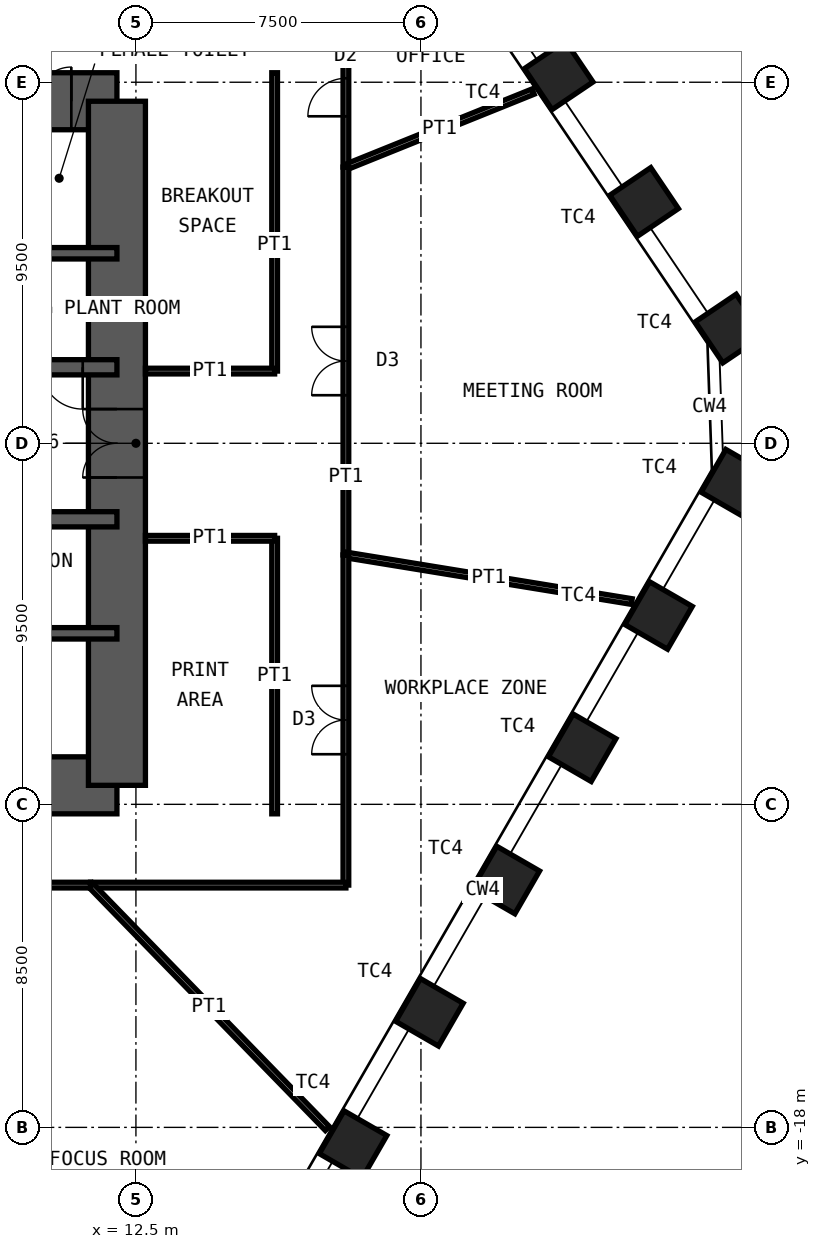
"""IFC4 building model, lengths in metres.
Left out: names, types, materials, properties, quantities, classifications, styles, units other than length and angle.
Written with IfcOpenShell. Run it as: python <this file> out.ifc"""

import sys

from ifc_helpers import new_model, si_unit, direction, frame, frame_2d, origin, origin_2d, place, context, subcontext, project, spatial, rectangle, hollow_rectangle, extrude, element, fill, save


model = new_model("IFC4")
c1 = context("Model", 3, precision=1e-05, world=origin(), true_north=direction((0.0, 1.0)))
c2 = subcontext(c1, "Body", "Model", "MODEL_VIEW")
j1 = project(units=[si_unit("LENGTHUNIT", "METRE"), si_unit("PLANEANGLEUNIT", "RADIAN")], contexts=[c1])
p1 = place(None, origin())
s1 = spatial("IfcSite", under=j1, at=p1, CompositionType="ELEMENT")
p2 = place(p1, origin())
s2 = spatial("IfcBuilding", under=s1, at=p2, CompositionType="ELEMENT")
p3 = place(p2, frame((0.0, 0.0, 149.2)))
s3 = spatial("IfcBuildingStorey", under=s2, at=p3, CompositionType="ELEMENT", Elevation=149.2)
for number, where, z_axis, x_axis in (
    (1, (23.625, 9.682, 0.0), (0.0, 0.0, 1.0), (-0.559, 0.829, 0.0)),
    (2, (25.872, 6.351, 0.0), (0.0, 0.0, 1.0), (-0.559, 0.829, 0.0)),
    (3, (28.119, 3.019, 0.0), (0.0, 0.0, 1.0), (-0.559, 0.829, 0.0)),
    (4, (28.261, -1.05, 0.0), (0.0, 0.0, 1.0), (0.5, 0.866, 0.0)),
    (5, (26.252, -4.53, 0.0), (0.0, 0.0, 1.0), (0.5, 0.866, 0.0)),
    (6, (24.242, -8.011, 0.0), (0.0, 0.0, 1.0), (0.5, 0.866, 0.0)),
    (7, (22.233, -11.491, 0.0), (0.0, 0.0, 1.0), (0.5, 0.866, 0.0)),
    (8, (20.223, -14.972, 0.0), (0.0, 0.0, 1.0), (0.5, 0.866, 0.0)),
    (9, (18.214, -18.453, 0.0), (0.0, 0.0, 1.0), (0.5, 0.866, 0.0)),
):
    element("IfcColumn", number, at=place(p3, frame(where, z_axis=z_axis, x_axis=x_axis)), inside=s3, PredefinedType="COLUMN", context=c2, shape_type="SweptSolid", body=[
        extrude(hollow_rectangle(XDim=1.3, YDim=1.3, WallThickness=0.1, at=origin_2d()), origin(), (0.0, 0.0, 1.0), 4.2),
    ])
p4 = place(p3, frame((-12.0, 9.0, 0.0), z_axis=(0.0, 0.0, 1.0), x_axis=(1.0, 0.0, 0.0)))
e10 = element("IfcWall", 10, at=p4, inside=s3, PredefinedType="SHEAR", context=c2, shape_type="SweptSolid", body=[
    extrude(rectangle(XDim=24.0, YDim=1.5, at=frame_2d((12.0, 0.0))), origin(), (0.0, 0.0, 1.0), 4.2),
])
p5 = place(p4, frame((10.4, 0.0, 0.0)))
e11 = element("IfcOpeningElement", 11, at=p5, cuts=e10, PredefinedType="OPENING", context=c2, shape_type="SweptSolid", body=[
    extrude(rectangle(XDim=1.0, YDim=2.1, at=frame_2d((0.5, 1.05))), frame((0.0, 0.76, 0.0), z_axis=(0.0, -1.0, 0.0), x_axis=(1.0, 0.0, 0.0)), (0.0, 0.0, 1.0), 1.52),
])
p6 = place(p4, frame((17.6, 0.0, 0.0)))
e12 = element("IfcOpeningElement", 12, at=p6, cuts=e10, PredefinedType="OPENING", context=c2, shape_type="SweptSolid", body=[
    extrude(rectangle(XDim=0.9, YDim=2.1, at=frame_2d((0.45, 1.05))), frame((0.0, 0.76, 0.0), z_axis=(0.0, -1.0, 0.0), x_axis=(1.0, 0.0, 0.0)), (0.0, 0.0, 1.0), 1.52),
])
p7 = place(p4, frame((21.9, 0.0, 0.0)))
e13 = element("IfcOpeningElement", 13, at=p7, cuts=e10, PredefinedType="OPENING", context=c2, shape_type="SweptSolid", body=[
    extrude(rectangle(XDim=0.9, YDim=2.1, at=frame_2d((0.45, 1.05))), frame((0.0, 0.76, 0.0), z_axis=(0.0, -1.0, 0.0), x_axis=(1.0, 0.0, 0.0)), (0.0, 0.0, 1.0), 1.52),
])
p8 = place(p3, frame((-12.0, -9.0, 0.0), z_axis=(0.0, 0.0, 1.0), x_axis=(1.0, 0.0, 0.0)))
e14 = element("IfcWall", 14, at=p8, inside=s3, PredefinedType="SHEAR", context=c2, shape_type="SweptSolid", body=[
    extrude(rectangle(XDim=24.0, YDim=1.5, at=frame_2d((12.0, 0.0))), origin(), (0.0, 0.0, 1.0), 4.2),
])
p9 = place(p8, frame((1.35, 0.0, 0.0)))
e15 = element("IfcOpeningElement", 15, at=p9, cuts=e14, PredefinedType="OPENING", context=c2, shape_type="SweptSolid", body=[
    extrude(rectangle(XDim=1.0, YDim=2.1, at=frame_2d((0.5, 1.05))), frame((0.0, 0.76, 0.0), z_axis=(0.0, -1.0, 0.0), x_axis=(1.0, 0.0, 0.0)), (0.0, 0.0, 1.0), 1.52),
])
p10 = place(p8, frame((5.325, 0.0, 0.0)))
e16 = element("IfcOpeningElement", 16, at=p10, cuts=e14, PredefinedType="OPENING", context=c2, shape_type="SweptSolid", body=[
    extrude(rectangle(XDim=1.15, YDim=2.1, at=frame_2d((0.575, 1.05))), frame((0.0, 0.76, 0.0), z_axis=(0.0, -1.0, 0.0), x_axis=(1.0, 0.0, 0.0)), (0.0, 0.0, 1.0), 1.52),
])
p11 = place(p8, frame((12.6, 0.0, 0.0)))
e17 = element("IfcOpeningElement", 17, at=p11, cuts=e14, PredefinedType="OPENING", context=c2, shape_type="SweptSolid", body=[
    extrude(rectangle(XDim=1.0, YDim=2.1, at=frame_2d((0.5, 1.05))), frame((0.0, 0.76, 0.0), z_axis=(0.0, -1.0, 0.0), x_axis=(1.0, 0.0, 0.0)), (0.0, 0.0, 1.0), 1.52),
])
p12 = place(p3, frame((12.0, -9.0, 0.0), z_axis=(0.0, 0.0, 1.0), x_axis=(0.0, 1.0, 0.0)))
e18 = element("IfcWall", 18, at=p12, inside=s3, PredefinedType="SHEAR", context=c2, shape_type="SweptSolid", body=[
    extrude(rectangle(XDim=18.0, YDim=1.5, at=frame_2d((9.0, 0.0))), origin(), (0.0, 0.0, 1.0), 4.2),
])
p13 = place(p12, frame((8.1, 0.0, 0.0)))
e19 = element("IfcOpeningElement", 19, at=p13, cuts=e18, PredefinedType="OPENING", context=c2, shape_type="SweptSolid", body=[
    extrude(rectangle(XDim=1.8, YDim=2.1, at=frame_2d((0.9, 1.05))), frame((0.0, 0.76, 0.0), z_axis=(0.0, -1.0, 0.0), x_axis=(1.0, 0.0, 0.0)), (0.0, 0.0, 1.0), 1.52),
])
p14 = place(p3, frame((-12.0, 5.0, 0.0), z_axis=(0.0, 0.0, 1.0), x_axis=(1.0, 0.0, 0.0)))
e20 = element("IfcWall", 20, at=p14, inside=s3, PredefinedType="SHEAR", context=c2, shape_type="SweptSolid", body=[
    extrude(rectangle(XDim=24.0, YDim=0.3, at=frame_2d((12.0, 0.0))), origin(), (0.0, 0.0, 1.0), 4.2),
])
p15 = place(p3, frame((-12.0, 2.0, 0.0), z_axis=(0.0, 0.0, 1.0), x_axis=(1.0, 0.0, 0.0)))
e21 = element("IfcWall", 21, at=p15, inside=s3, PredefinedType="SHEAR", context=c2, shape_type="SweptSolid", body=[
    extrude(rectangle(XDim=24.0, YDim=0.4, at=frame_2d((12.0, 0.0))), origin(), (0.0, 0.0, 1.0), 4.2),
])
p16 = place(p15, frame((2.4, 0.0, 0.0)))
e22 = element("IfcOpeningElement", 22, at=p16, cuts=e21, PredefinedType="OPENING", context=c2, shape_type="SweptSolid", body=[
    extrude(rectangle(XDim=1.1, YDim=2.1, at=frame_2d((0.55, 1.05))), frame((0.0, 0.21, 0.0), z_axis=(0.0, -1.0, 0.0), x_axis=(1.0, 0.0, 0.0)), (0.0, 0.0, 1.0), 0.42),
])
p17 = place(p15, frame((22.0, 0.0, 0.0)))
e23 = element("IfcOpeningElement", 23, at=p17, cuts=e21, PredefinedType="OPENING", context=c2, shape_type="SweptSolid", body=[
    extrude(rectangle(XDim=1.1, YDim=2.1, at=frame_2d((0.55, 1.05))), frame((0.0, 0.21, 0.0), z_axis=(0.0, -1.0, 0.0), x_axis=(1.0, 0.0, 0.0)), (0.0, 0.0, 1.0), 0.42),
])
p18 = place(p15, frame((10.15, 0.0, 0.0)))
e24 = element("IfcOpeningElement", 24, at=p18, cuts=e21, PredefinedType="OPENING", context=c2, shape_type="SweptSolid", body=[
    extrude(rectangle(XDim=1.0, YDim=2.1, at=frame_2d((0.5, 1.05))), frame((0.0, 0.21, 0.0), z_axis=(0.0, -1.0, 0.0), x_axis=(1.0, 0.0, 0.0)), (0.0, 0.0, 1.0), 0.42),
])
p19 = place(p15, frame((6.9, 0.0, 0.0)))
e25 = element("IfcOpeningElement", 25, at=p19, cuts=e21, PredefinedType="OPENING", context=c2, shape_type="SweptSolid", body=[
    extrude(rectangle(XDim=1.0, YDim=2.1, at=frame_2d((0.5, 1.05))), frame((0.0, 0.21, 0.0), z_axis=(0.0, -1.0, 0.0), x_axis=(1.0, 0.0, 0.0)), (0.0, 0.0, 1.0), 0.42),
])
p20 = place(p15, frame((13.35, 0.0, 0.0)))
e26 = element("IfcOpeningElement", 26, at=p20, cuts=e21, PredefinedType="OPENING", context=c2, shape_type="SweptSolid", body=[
    extrude(rectangle(XDim=1.1, YDim=2.4, at=frame_2d((0.55, 1.2))), frame((0.0, 0.21, 0.0), z_axis=(0.0, -1.0, 0.0), x_axis=(1.0, 0.0, 0.0)), (0.0, 0.0, 1.0), 0.42),
])
p21 = place(p15, frame((16.15, 0.0, 0.0)))
e27 = element("IfcOpeningElement", 27, at=p21, cuts=e21, PredefinedType="OPENING", context=c2, shape_type="SweptSolid", body=[
    extrude(rectangle(XDim=1.1, YDim=2.4, at=frame_2d((0.55, 1.2))), frame((0.0, 0.21, 0.0), z_axis=(0.0, -1.0, 0.0), x_axis=(1.0, 0.0, 0.0)), (0.0, 0.0, 1.0), 0.42),
])
p22 = place(p15, frame((18.95, 0.0, 0.0)))
e28 = element("IfcOpeningElement", 28, at=p22, cuts=e21, PredefinedType="OPENING", context=c2, shape_type="SweptSolid", body=[
    extrude(rectangle(XDim=1.1, YDim=2.4, at=frame_2d((0.55, 1.2))), frame((0.0, 0.21, 0.0), z_axis=(0.0, -1.0, 0.0), x_axis=(1.0, 0.0, 0.0)), (0.0, 0.0, 1.0), 0.42),
])
p23 = place(p3, frame((-12.0, -2.0, 0.0), z_axis=(0.0, 0.0, 1.0), x_axis=(1.0, 0.0, 0.0)))
e29 = element("IfcWall", 29, at=p23, inside=s3, PredefinedType="SHEAR", context=c2, shape_type="SweptSolid", body=[
    extrude(rectangle(XDim=24.0, YDim=0.4, at=frame_2d((12.0, 0.0))), origin(), (0.0, 0.0, 1.0), 4.2),
])
p24 = place(p23, frame((1.1, 0.0, 0.0)))
e30 = element("IfcOpeningElement", 30, at=p24, cuts=e29, PredefinedType="OPENING", context=c2, shape_type="SweptSolid", body=[
    extrude(rectangle(XDim=1.1, YDim=2.1, at=frame_2d((0.55, 1.05))), frame((0.0, 0.21, 0.0), z_axis=(0.0, -1.0, 0.0), x_axis=(1.0, 0.0, 0.0)), (0.0, 0.0, 1.0), 0.42),
])
p25 = place(p23, frame((13.55, 0.0, 0.0)))
e31 = element("IfcOpeningElement", 31, at=p25, cuts=e29, PredefinedType="OPENING", context=c2, shape_type="SweptSolid", body=[
    extrude(rectangle(XDim=1.1, YDim=2.1, at=frame_2d((0.55, 1.05))), frame((0.0, 0.21, 0.0), z_axis=(0.0, -1.0, 0.0), x_axis=(1.0, 0.0, 0.0)), (0.0, 0.0, 1.0), 0.42),
])
p26 = place(p23, frame((20.7, 0.0, 0.0)))
e32 = element("IfcOpeningElement", 32, at=p26, cuts=e29, PredefinedType="OPENING", context=c2, shape_type="SweptSolid", body=[
    extrude(rectangle(XDim=1.1, YDim=2.1, at=frame_2d((0.55, 1.05))), frame((0.0, 0.21, 0.0), z_axis=(0.0, -1.0, 0.0), x_axis=(1.0, 0.0, 0.0)), (0.0, 0.0, 1.0), 0.42),
])
p27 = place(p23, frame((4.0, 0.0, 0.0)))
e33 = element("IfcOpeningElement", 33, at=p27, cuts=e29, PredefinedType="OPENING", context=c2, shape_type="SweptSolid", body=[
    extrude(rectangle(XDim=1.0, YDim=2.1, at=frame_2d((0.5, 1.05))), frame((0.0, 0.21, 0.0), z_axis=(0.0, -1.0, 0.0), x_axis=(1.0, 0.0, 0.0)), (0.0, 0.0, 1.0), 0.42),
])
p28 = place(p3, frame((-12.0, -5.0, 0.0), z_axis=(0.0, 0.0, 1.0), x_axis=(1.0, 0.0, 0.0)))
e34 = element("IfcWall", 34, at=p28, inside=s3, PredefinedType="SHEAR", context=c2, shape_type="SweptSolid", body=[
    extrude(rectangle(XDim=24.0, YDim=0.3, at=frame_2d((12.0, 0.0))), origin(), (0.0, 0.0, 1.0), 4.2),
])
p29 = place(p3, frame((18.025, 10.941, 0.0), z_axis=(0.0, 0.0, 1.0), x_axis=(0.0, -1.0, 0.0)))
e35 = element("IfcWall", 35, at=p29, inside=s3, PredefinedType="PARTITIONING", context=c2, shape_type="SweptSolid", body=[
    extrude(rectangle(XDim=3.673, YDim=0.15, at=frame_2d((1.837, 0.0))), origin(), (0.0, 0.0, 1.0), 4.03),
])
p30 = place(p29, frame((1.337, 0.0, 0.0)))
e36 = element("IfcOpeningElement", 36, at=p30, cuts=e35, PredefinedType="OPENING", context=c2, shape_type="SweptSolid", body=[
    extrude(rectangle(XDim=1.0, YDim=2.4, at=frame_2d((0.5, 1.2))), frame((0.0, 0.085, 0.0), z_axis=(0.0, -1.0, 0.0), x_axis=(1.0, 0.0, 0.0)), (0.0, 0.0, 1.0), 0.17),
])
p31 = place(p3, frame((22.951, 9.254, 0.0), z_axis=(0.0, 0.0, 1.0), x_axis=(-0.927452527427, -0.37394091695, 0.0)))
e37 = element("IfcWall", 37, at=p31, inside=s3, PredefinedType="PARTITIONING", context=c2, shape_type="SweptSolid", body=[
    extrude(rectangle(XDim=5.312, YDim=0.15, at=frame_2d((2.656, 0.0))), origin(), (0.0, 0.0, 1.0), 3.33),
])
p32 = place(p3, frame((18.025, 7.267, 0.0), z_axis=(0.0, 0.0, 1.0), x_axis=(0.0, -1.0, 0.0)))
e38 = element("IfcWall", 38, at=p32, inside=s3, PredefinedType="PARTITIONING", context=c2, shape_type="SweptSolid", body=[
    extrude(rectangle(XDim=10.205, YDim=0.15, at=frame_2d((5.103, 0.0))), origin(), (0.0, 0.0, 1.0), 4.03),
])
p33 = place(p32, frame((4.203, 0.0, 0.0)))
e39 = element("IfcOpeningElement", 39, at=p33, cuts=e38, PredefinedType="OPENING", context=c2, shape_type="SweptSolid", body=[
    extrude(rectangle(XDim=1.8, YDim=2.4, at=frame_2d((0.9, 1.2))), frame((0.0, 0.085, 0.0), z_axis=(0.0, -1.0, 0.0), x_axis=(1.0, 0.0, 0.0)), (0.0, 0.0, 1.0), 0.17),
])
p34 = place(p3, frame((25.547, -4.164, 0.0), z_axis=(0.0, 0.0, 1.0), x_axis=(-0.986975470567, 0.160870819291, 0.0)))
e40 = element("IfcWall", 40, at=p34, inside=s3, PredefinedType="PARTITIONING", context=c2, shape_type="SweptSolid", body=[
    extrude(rectangle(XDim=7.622, YDim=0.15, at=frame_2d((3.811, 0.0))), origin(), (0.0, 0.0, 1.0), 4.03),
])
p35 = place(p3, frame((18.025, -2.938, 0.0), z_axis=(0.0, 0.0, 1.0), x_axis=(0.0, -1.0, 0.0)))
e41 = element("IfcWall", 41, at=p35, inside=s3, PredefinedType="PARTITIONING", context=c2, shape_type="SweptSolid", body=[
    extrude(rectangle(XDim=8.687, YDim=0.15, at=frame_2d((4.344, 0.0))), origin(), (0.0, 0.0, 1.0), 4.03),
])
p36 = place(p35, frame((3.443, 0.0, 0.0)))
e42 = element("IfcOpeningElement", 42, at=p36, cuts=e41, PredefinedType="OPENING", context=c2, shape_type="SweptSolid", body=[
    extrude(rectangle(XDim=1.8, YDim=2.4, at=frame_2d((0.9, 1.2))), frame((0.0, 0.085, 0.0), z_axis=(0.0, -1.0, 0.0), x_axis=(1.0, 0.0, 0.0)), (0.0, 0.0, 1.0), 0.17),
])
p37 = place(p3, frame((18.025, -11.625, 0.0), z_axis=(0.0, 0.0, 1.0), x_axis=(-1.0, 0.0, 0.0)))
e43 = element("IfcWall", 43, at=p37, inside=s3, PredefinedType="PARTITIONING", context=c2, shape_type="SweptSolid", body=[
    extrude(rectangle(XDim=6.718, YDim=0.15, at=frame_2d((3.359, 0.0))), origin(), (0.0, 0.0, 1.0), 4.03),
])
p38 = place(p3, frame((17.538, -18.031, 0.0), z_axis=(0.0, 0.0, 1.0), x_axis=(-0.697230918085, 0.716846599257, 0.0)))
e44 = element("IfcWall", 44, at=p38, inside=s3, PredefinedType="PARTITIONING", context=c2, shape_type="SweptSolid", body=[
    extrude(rectangle(XDim=8.936, YDim=0.15, at=frame_2d((4.468, 0.0))), origin(), (0.0, 0.0, 1.0), 3.33),
])
p39 = place(p3, frame((11.307, -11.625, 0.0), z_axis=(0.0, 0.0, 1.0), x_axis=(-1.0, 0.0, 0.0)))
e45 = element("IfcWall", 45, at=p39, inside=s3, PredefinedType="PARTITIONING", context=c2, shape_type="SweptSolid", body=[
    extrude(rectangle(XDim=7.123, YDim=0.15, at=frame_2d((3.562, 0.0))), origin(), (0.0, 0.0, 1.0), 4.03),
])
p40 = place(p39, frame((3.062, 0.0, 0.0)))
e46 = element("IfcOpeningElement", 46, at=p40, cuts=e45, PredefinedType="OPENING", context=c2, shape_type="SweptSolid", body=[
    extrude(rectangle(XDim=1.0, YDim=2.4, at=frame_2d((0.5, 1.2))), frame((0.0, 0.085, 0.0), z_axis=(0.0, -1.0, 0.0), x_axis=(1.0, 0.0, 0.0)), (0.0, 0.0, 1.0), 0.17),
])
p41 = place(p3, frame((16.15, 1.9, 0.0), z_axis=(0.0, 0.0, 1.0), x_axis=(0.0, 1.0, 0.0)))
e47 = element("IfcWall", 47, at=p41, inside=s3, PredefinedType="PARTITIONING", context=c2, shape_type="SweptSolid", body=[
    extrude(rectangle(XDim=7.85, YDim=0.15, at=frame_2d((3.925, 0.0))), origin(), (0.0, 0.0, 1.0), 4.03),
])
p42 = place(p3, frame((12.75, 1.9, 0.0), z_axis=(0.0, 0.0, 1.0), x_axis=(1.0, 0.0, 0.0)))
e48 = element("IfcWall", 48, at=p42, inside=s3, PredefinedType="PARTITIONING", context=c2, shape_type="SweptSolid", body=[
    extrude(rectangle(XDim=3.4, YDim=0.15, at=frame_2d((1.7, 0.0))), origin(), (0.0, 0.0, 1.0), 2.93),
])
p43 = place(p3, frame((16.15, -9.75, 0.0), z_axis=(0.0, 0.0, 1.0), x_axis=(0.0, 1.0, 0.0)))
e49 = element("IfcWall", 49, at=p43, inside=s3, PredefinedType="PARTITIONING", context=c2, shape_type="SweptSolid", body=[
    extrude(rectangle(XDim=7.25, YDim=0.15, at=frame_2d((3.625, 0.0))), origin(), (0.0, 0.0, 1.0), 4.03),
])
p44 = place(p3, frame((12.75, -2.5, 0.0), z_axis=(0.0, 0.0, 1.0), x_axis=(1.0, 0.0, 0.0)))
e50 = element("IfcWall", 50, at=p44, inside=s3, PredefinedType="PARTITIONING", context=c2, shape_type="SweptSolid", body=[
    extrude(rectangle(XDim=3.4, YDim=0.15, at=frame_2d((1.7, 0.0))), origin(), (0.0, 0.0, 1.0), 3.33),
])
p45 = place(p7, origin())
e51 = element("IfcDoor", 51, at=p45, inside=s3, OperationType="SINGLE_SWING_LEFT", PredefinedType="DOOR", context=c2, shape_type="SweptSolid", body=[
    extrude(rectangle(XDim=0.9, YDim=2.1, at=frame_2d((0.45, 1.05))), frame((0.0, 0.025, 0.0), z_axis=(0.0, -1.0, 0.0), x_axis=(1.0, 0.0, 0.0)), (0.0, 0.0, 1.0), 0.05),
])
fill(e13, e51)
p46 = place(p17, origin())
e52 = element("IfcDoor", 52, at=p46, inside=s3, OperationType="SINGLE_SWING_RIGHT", PredefinedType="DOOR", context=c2, shape_type="SweptSolid", body=[
    extrude(rectangle(XDim=1.1, YDim=2.1, at=frame_2d((0.55, 1.05))), frame((0.0, 0.025, 0.0), z_axis=(0.0, -1.0, 0.0), x_axis=(1.0, 0.0, 0.0)), (0.0, 0.0, 1.0), 0.05),
])
fill(e23, e52)
p47 = place(p13, origin())
e53 = element("IfcDoor", 53, at=p47, inside=s3, OperationType="DOUBLE_DOOR_DOUBLE_SWING", PredefinedType="DOOR", context=c2, shape_type="SweptSolid", body=[
    extrude(rectangle(XDim=1.8, YDim=2.1, at=frame_2d((0.9, 1.05))), frame((0.0, 0.025, 0.0), z_axis=(0.0, -1.0, 0.0), x_axis=(1.0, 0.0, 0.0)), (0.0, 0.0, 1.0), 0.05),
])
fill(e19, e53)
p48 = place(p30, origin())
e54 = element("IfcDoor", 54, at=p48, inside=s3, OperationType="SINGLE_SWING_RIGHT", PredefinedType="DOOR", context=c2, shape_type="SweptSolid", body=[
    extrude(rectangle(XDim=1.0, YDim=2.4, at=frame_2d((0.5, 1.2))), frame((0.0, 0.025, 0.0), z_axis=(0.0, -1.0, 0.0), x_axis=(1.0, 0.0, 0.0)), (0.0, 0.0, 1.0), 0.05),
])
fill(e36, e54)
p49 = place(p33, origin())
e55 = element("IfcDoor", 55, at=p49, inside=s3, OperationType="DOUBLE_DOOR_DOUBLE_SWING", PredefinedType="DOOR", context=c2, shape_type="SweptSolid", body=[
    extrude(rectangle(XDim=1.8, YDim=2.4, at=frame_2d((0.9, 1.2))), frame((0.0, 0.025, 0.0), z_axis=(0.0, -1.0, 0.0), x_axis=(1.0, 0.0, 0.0)), (0.0, 0.0, 1.0), 0.05),
])
fill(e39, e55)
p50 = place(p36, origin())
e56 = element("IfcDoor", 56, at=p50, inside=s3, OperationType="DOUBLE_DOOR_DOUBLE_SWING", PredefinedType="DOOR", context=c2, shape_type="SweptSolid", body=[
    extrude(rectangle(XDim=1.8, YDim=2.4, at=frame_2d((0.9, 1.2))), frame((0.0, 0.025, 0.0), z_axis=(0.0, -1.0, 0.0), x_axis=(1.0, 0.0, 0.0)), (0.0, 0.0, 1.0), 0.05),
])
fill(e42, e56)
save(model, sys.argv[1])
